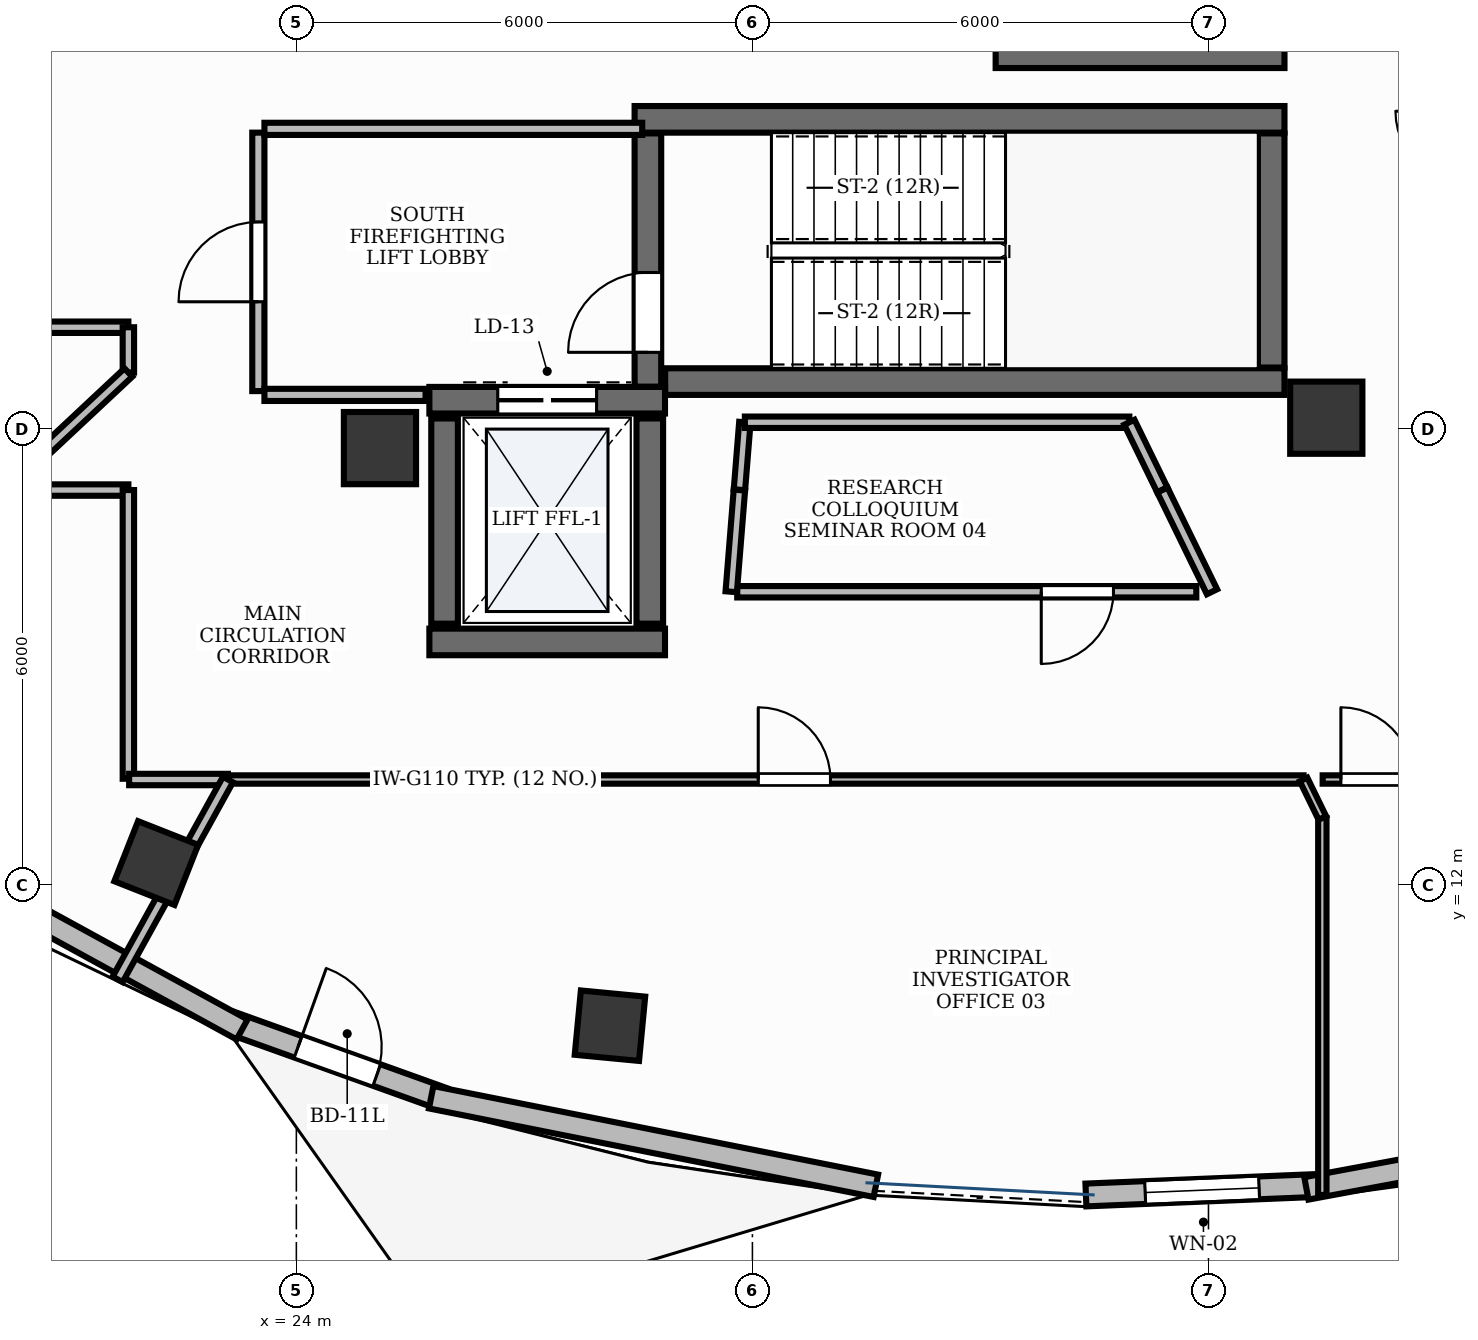
"""IFC4 building model, lengths in metres.
Left out: names, types, materials, properties, quantities, classifications, styles, units other than length and angle.
Written with IfcOpenShell. Run it as: python <this file> out.ifc"""

import sys

from ifc_helpers import new_model, si_unit, direction, frame, frame_2d, origin, origin_2d, place, context, subcontext, project, spatial, rectangle, extrude, element, fill, save


model = new_model("IFC4")
c1 = context("Model", 3, precision=1e-05, world=origin(), true_north=direction((0.0, 1.0)))
c2 = subcontext(c1, "Body", "Model", "MODEL_VIEW")
j1 = project(units=[si_unit("LENGTHUNIT", "METRE"), si_unit("PLANEANGLEUNIT", "RADIAN")], contexts=[c1])
p1 = place(None, origin())
s1 = spatial("IfcSite", under=j1, at=p1, CompositionType="ELEMENT")
p2 = place(p1, origin())
s2 = spatial("IfcBuilding", under=s1, at=p2, CompositionType="ELEMENT")
p3 = place(p2, frame((0.0, 0.0, 297.6)))
s3 = spatial("IfcBuildingStorey", under=s2, at=p3, CompositionType="ELEMENT", Elevation=297.6)
p4 = place(p3, frame((28.852, 18.625, 0.0), z_axis=(0.0, 0.0, 1.0), x_axis=(1.0, 0.0, 0.0)))
e1 = element("IfcWall", 1, at=p4, inside=s3, PredefinedType="SHEAR", context=c2, shape_type="SweptSolid", body=[
    extrude(rectangle(XDim=8.148, YDim=0.35, at=frame_2d((4.074, 0.0))), origin(), (0.0, 0.0, 1.0), 3.9),
])
p5 = place(p3, frame((28.45, 22.075, 0.0), z_axis=(0.0, 0.0, 1.0), x_axis=(1.0, 0.0, 0.0)))
e2 = element("IfcWall", 2, at=p5, inside=s3, PredefinedType="SHEAR", context=c2, shape_type="SweptSolid", body=[
    extrude(rectangle(XDim=8.55, YDim=0.35, at=frame_2d((4.275, 0.0))), origin(), (0.0, 0.0, 1.0), 3.9),
])
p6 = place(p3, frame((36.825, 18.81, 0.0), z_axis=(0.0, 0.0, 1.0), x_axis=(0.0, 1.0, 0.0)))
e3 = element("IfcWall", 3, at=p6, inside=s3, PredefinedType="SHEAR", context=c2, shape_type="SweptSolid", body=[
    extrude(rectangle(XDim=3.08, YDim=0.35, at=frame_2d((1.54, 0.0))), origin(), (0.0, 0.0, 1.0), 3.9),
])
p7 = place(p3, frame((28.625, 18.557, 0.0), z_axis=(0.0, 0.0, 1.0), x_axis=(0.0, 1.0, 0.0)))
e4 = element("IfcWall", 4, at=p7, inside=s3, PredefinedType="SHEAR", context=c2, shape_type="SweptSolid", body=[
    extrude(rectangle(XDim=3.333, YDim=0.35, at=frame_2d((1.667, 0.0))), origin(), (0.0, 0.0, 1.0), 3.9),
])
p8 = place(p7, frame((0.453, 0.0, 0.0)))
e5 = element("IfcOpeningElement", 5, at=p8, cuts=e4, PredefinedType="OPENING", context=c2, shape_type="SweptSolid", body=[
    extrude(rectangle(XDim=1.05, YDim=2.15, at=frame_2d((0.525, 1.075))), frame((0.0, 0.19, 0.0), z_axis=(0.0, -1.0, 0.0), x_axis=(1.0, 0.0, 0.0)), (0.0, 0.0, 1.0), 0.38),
])
p9 = place(p3, frame((33.2, 22.925, 0.0), z_axis=(0.0, 0.0, 1.0), x_axis=(1.0, 0.0, 0.0)))
e6 = element("IfcWall", 6, at=p9, inside=s3, PredefinedType="SHEAR", context=c2, shape_type="SweptSolid", body=[
    extrude(rectangle(XDim=3.8, YDim=0.35, at=frame_2d((1.9, 0.0))), origin(), (0.0, 0.0, 1.0), 3.9),
])
p10 = place(p3, frame((25.75, 15.2, 0.0), z_axis=(0.0, 0.0, 1.0), x_axis=(1.0, 0.0, 0.0)))
e7 = element("IfcWall", 7, at=p10, inside=s3, PredefinedType="SHEAR", context=c2, shape_type="SweptSolid", body=[
    extrude(rectangle(XDim=3.1, YDim=0.35, at=frame_2d((1.55, 0.0))), origin(), (0.0, 0.0, 1.0), 3.9),
])
p11 = place(p3, frame((25.75, 18.38, 0.0), z_axis=(0.0, 0.0, 1.0), x_axis=(1.0, 0.0, 0.0)))
e8 = element("IfcWall", 8, at=p11, inside=s3, PredefinedType="SHEAR", context=c2, shape_type="SweptSolid", body=[
    extrude(rectangle(XDim=3.1, YDim=0.35, at=frame_2d((1.55, 0.0))), origin(), (0.0, 0.0, 1.0), 3.9),
])
p12 = place(p11, frame((0.9, 0.0, 0.0)))
e9 = element("IfcOpeningElement", 9, at=p12, cuts=e8, PredefinedType="OPENING", context=c2, shape_type="SweptSolid", body=[
    extrude(rectangle(XDim=1.3, YDim=2.2, at=frame_2d((0.65, 1.1))), frame((0.0, 0.19, 0.0), z_axis=(0.0, -1.0, 0.0), x_axis=(1.0, 0.0, 0.0)), (0.0, 0.0, 1.0), 0.38),
])
for number, where, z_axis, x_axis in (
    (10, (25.95, 15.44, 0.0), (0.0, 0.0, 1.0), (0.0, 1.0, 0.0)),
    (11, (28.65, 15.44, 0.0), (0.0, 0.0, 1.0), (0.0, 1.0, 0.0)),
):
    element("IfcWall", number, at=place(p3, frame(where, z_axis=z_axis, x_axis=x_axis)), inside=s3, PredefinedType="SHEAR", context=c2, shape_type="SweptSolid", body=[
        extrude(rectangle(XDim=2.7, YDim=0.35, at=frame_2d((1.35, 0.0))), origin(), (0.0, 0.0, 1.0), 3.9),
    ])
for number, where, z_axis, x_axis in (
    (12, (25.1, 17.75, -0.0), (0.0, 0.0, 1.0), (1.0, 0.0, 0.0)),
    (13, (37.55, 18.15, -0.0), (0.0, 0.0, 1.0), (1.0, 0.0, 0.0)),
):
    element("IfcColumn", number, at=place(p3, frame(where, z_axis=z_axis, x_axis=x_axis)), inside=s3, PredefinedType="PILASTER", context=c2, shape_type="SweptSolid", body=[
        extrude(rectangle(XDim=0.95, YDim=0.95, at=origin_2d()), origin(), (0.0, 0.0, 1.0), 3.901),
    ])
for number, where, z_axis, x_axis in (
    (14, (22.157, 12.291, -0.0), (0.0, 0.0, 1.0), (-0.93, 0.367, 0.0)),
    (15, (28.126, 10.151, -0.0), (0.0, 0.0, 1.0), (-0.995, 0.095, 0.0)),
):
    element("IfcColumn", number, at=place(p3, frame(where, z_axis=z_axis, x_axis=x_axis)), inside=s3, PredefinedType="COLUMN", context=c2, shape_type="SweptSolid", body=[
        extrude(rectangle(XDim=0.85, YDim=0.85, at=origin_2d()), origin(), (0.0, 0.0, 1.0), 3.901),
    ])
p13 = place(p3, frame((23.146, 10.188, 0.0), z_axis=(0.0, 0.0, 1.0), x_axis=(0.941228252746, -0.337771189169, 0.0)))
e16 = element("IfcWall", 16, at=p13, inside=s3, PredefinedType="STANDARD", context=c2, shape_type="SweptSolid", body=[
    extrude(rectangle(XDim=2.963, YDim=0.3, at=frame_2d((1.482, 0.0))), origin(), (0.0, 0.0, 1.0), 3.9),
])
p14 = place(p13, frame((0.932, 0.0, 0.0)))
e17 = element("IfcOpeningElement", 17, at=p14, cuts=e16, PredefinedType="OPENING", context=c2, shape_type="SweptSolid", body=[
    extrude(rectangle(XDim=1.1, YDim=2.15, at=frame_2d((0.55, 1.075))), frame((0.0, 0.165, 0.0), z_axis=(0.0, -1.0, 0.0), x_axis=(1.0, 0.0, 0.0)), (0.0, 0.0, 1.0), 0.33),
])
p15 = place(p3, frame((34.388, 7.924, 0.0), z_axis=(0.0, 0.0, 1.0), x_axis=(0.999155735102, 0.041083050186, 0.0)))
e18 = element("IfcWall", 18, at=p15, inside=s3, PredefinedType="STANDARD", context=c2, shape_type="SweptSolid", body=[
    extrude(rectangle(XDim=3.061, YDim=0.3, at=frame_2d((1.53, 0.0))), origin(), (0.0, 0.0, 1.0), 3.9),
])
p16 = place(p15, frame((0.78, 0.0, 0.95)))
e19 = element("IfcOpeningElement", 19, at=p16, cuts=e18, PredefinedType="OPENING", context=c2, shape_type="SweptSolid", body=[
    extrude(rectangle(XDim=1.5, YDim=1.8, at=frame_2d((0.75, 0.9))), frame((0.0, 0.165, 0.0), z_axis=(0.0, -1.0, 0.0), x_axis=(1.0, 0.0, 0.0)), (0.0, 0.0, 1.0), 0.33),
])
p17 = place(p3, frame((18.327, 12.818, 0.0), z_axis=(0.0, 0.0, 1.0), x_axis=(0.877062479499, -0.480376318166, 0.0)))
e20 = element("IfcWall", 20, at=p17, inside=s3, PredefinedType="STANDARD", context=c2, shape_type="SweptSolid", body=[
    extrude(rectangle(XDim=5.654, YDim=0.3, at=frame_2d((2.827, 0.0))), origin(), (0.0, 0.0, 1.0), 3.9),
])
p18 = place(p3, frame((25.774, 9.21, 0.0), z_axis=(0.0, 0.0, 1.0), x_axis=(0.98075343527, -0.19525035008, 0.0)))
e21 = element("IfcWall", 21, at=p18, inside=s3, PredefinedType="STANDARD", context=c2, shape_type="SweptSolid", body=[
    extrude(rectangle(XDim=5.966, YDim=0.3, at=frame_2d((2.983, 0.0))), origin(), (0.0, 0.0, 1.0), 3.9),
])
p19 = place(p3, frame((37.288, 8.01, 0.0), z_axis=(0.0, 0.0, 1.0), x_axis=(0.983103205954, 0.183052141321, 0.0)))
e22 = element("IfcWall", 22, at=p19, inside=s3, PredefinedType="STANDARD", context=c2, shape_type="SweptSolid", body=[
    extrude(rectangle(XDim=5.974, YDim=0.3, at=frame_2d((2.987, 0.0))), origin(), (0.0, 0.0, 1.0), 3.9),
])
p20 = place(p3, frame((23.5, 18.5, 0.0), z_axis=(0.0, 0.0, 1.0), x_axis=(0.0, 1.0, 0.0)))
e23 = element("IfcWall", 23, at=p20, inside=s3, PredefinedType="PARTITIONING", context=c2, shape_type="SweptSolid", body=[
    extrude(rectangle(XDim=3.4, YDim=0.16, at=frame_2d((1.7, 0.0))), origin(), (0.0, 0.0, 1.0), 2.22),
])
p21 = place(p20, frame((1.175, 0.0, 0.0)))
e24 = element("IfcOpeningElement", 24, at=p21, cuts=e23, PredefinedType="OPENING", context=c2, shape_type="SweptSolid", body=[
    extrude(rectangle(XDim=1.05, YDim=2.15, at=frame_2d((0.525, 1.075))), frame((0.0, 0.095, 0.0), z_axis=(0.0, -1.0, 0.0), x_axis=(1.0, 0.0, 0.0)), (0.0, 0.0, 1.0), 0.19),
])
p22 = place(p3, frame((23.58, 21.95, 0.0), z_axis=(0.0, 0.0, 1.0), x_axis=(1.0, 0.0, 0.0)))
e25 = element("IfcWall", 25, at=p22, inside=s3, PredefinedType="PARTITIONING", context=c2, shape_type="SweptSolid", body=[
    extrude(rectangle(XDim=4.97, YDim=0.16, at=frame_2d((2.485, 0.0))), origin(), (0.0, 0.0, 1.0), 2.22),
])
p23 = place(p3, frame((23.58, 18.45, 0.0), z_axis=(0.0, 0.0, 1.0), x_axis=(1.0, 0.0, 0.0)))
e26 = element("IfcWall", 26, at=p23, inside=s3, PredefinedType="PARTITIONING", context=c2, shape_type="SweptSolid", body=[
    extrude(rectangle(XDim=2.12, YDim=0.16, at=frame_2d((1.06, 0.0))), origin(), (0.0, 0.0, 1.0), 2.22),
])
p24 = place(p3, frame((17.8, 19.34, 0.0), z_axis=(0.0, 0.0, 1.0), x_axis=(1.0, 0.0, 0.0)))
e27 = element("IfcWall", 27, at=p24, inside=s3, PredefinedType="PARTITIONING", context=c2, shape_type="SweptSolid", body=[
    extrude(rectangle(XDim=3.99, YDim=0.15, at=frame_2d((1.995, 0.0))), origin(), (0.0, 0.0, 1.0), 2.22),
])
p25 = place(p24, frame((0.507, 0.0, 0.0)))
e28 = element("IfcOpeningElement", 28, at=p25, cuts=e27, PredefinedType="OPENING", context=c2, shape_type="SweptSolid", body=[
    extrude(rectangle(XDim=0.95, YDim=2.15, at=frame_2d((0.475, 1.075))), frame((0.0, 0.09, 0.0), z_axis=(0.0, -1.0, 0.0), x_axis=(1.0, 0.0, 0.0)), (0.0, 0.0, 1.0), 0.18),
])
p26 = place(p3, frame((23.11, 13.39, 0.0), z_axis=(0.0, 0.0, 1.0), x_axis=(1.0, 0.0, 0.0)))
e29 = element("IfcWall", 29, at=p26, inside=s3, PredefinedType="MOVABLE", context=c2, shape_type="SweptSolid", body=[
    extrude(rectangle(XDim=14.141, YDim=0.11, at=frame_2d((7.071, 0.0))), origin(), (0.0, 0.0, 1.0), 2.22),
])
p27 = place(p26, frame((6.967, 0.0, 0.0)))
e30 = element("IfcOpeningElement", 30, at=p27, cuts=e29, PredefinedType="OPENING", context=c2, shape_type="SweptSolid", body=[
    extrude(rectangle(XDim=0.95, YDim=2.15, at=frame_2d((0.475, 1.075))), frame((0.0, 0.07, 0.0), z_axis=(0.0, -1.0, 0.0), x_axis=(1.0, 0.0, 0.0)), (0.0, 0.0, 1.0), 0.14),
])
p28 = place(p3, frame((35.84, 15.86, 0.0), z_axis=(0.0, 0.0, 1.0), x_axis=(-1.0, 0.0, 0.0)))
e31 = element("IfcWall", 31, at=p28, inside=s3, PredefinedType="PARTITIONING", context=c2, shape_type="SweptSolid", body=[
    extrude(rectangle(XDim=6.04, YDim=0.15, at=frame_2d((3.02, 0.0))), origin(), (0.0, 0.0, 1.0), 2.22),
])
p29 = place(p28, frame((1.09, 0.0, 0.0)))
e32 = element("IfcOpeningElement", 32, at=p29, cuts=e31, PredefinedType="OPENING", context=c2, shape_type="SweptSolid", body=[
    extrude(rectangle(XDim=0.95, YDim=2.15, at=frame_2d((0.475, 1.075))), frame((0.0, 0.09, 0.0), z_axis=(0.0, -1.0, 0.0), x_axis=(1.0, 0.0, 0.0)), (0.0, 0.0, 1.0), 0.18),
])
p30 = place(p3, frame((37.502, 13.39, 0.0), z_axis=(0.0, 0.0, 1.0), x_axis=(1.0, 0.0, 0.0)))
e33 = element("IfcWall", 33, at=p30, inside=s3, PredefinedType="MOVABLE", context=c2, shape_type="SweptSolid", body=[
    extrude(rectangle(XDim=1.898, YDim=0.11, at=frame_2d((0.949, 0.0))), origin(), (0.0, 0.0, 1.0), 2.22),
])
p31 = place(p30, frame((0.24, 0.0, 0.0)))
e34 = element("IfcOpeningElement", 34, at=p31, cuts=e33, PredefinedType="OPENING", context=c2, shape_type="SweptSolid", body=[
    extrude(rectangle(XDim=0.95, YDim=2.15, at=frame_2d((0.475, 1.075))), frame((0.0, 0.07, 0.0), z_axis=(0.0, -1.0, 0.0), x_axis=(1.0, 0.0, 0.0)), (0.0, 0.0, 1.0), 0.14),
])
p32 = place(p3, frame((20.148, 17.198, 0.0), z_axis=(0.0, 0.0, 1.0), x_axis=(1.0, 0.0, 0.0)))
e35 = element("IfcWall", 35, at=p32, inside=s3, PredefinedType="PARTITIONING", context=c2, shape_type="SweptSolid", body=[
    extrude(rectangle(XDim=1.642, YDim=0.15, at=frame_2d((0.821, 0.0))), origin(), (0.0, 0.0, 1.0), 2.22),
])
p33 = place(p3, frame((21.79, 17.198, 0.0), z_axis=(0.0, 0.0, 1.0), x_axis=(0.0, -1.0, 0.0)))
e36 = element("IfcWall", 36, at=p33, inside=s3, PredefinedType="PARTITIONING", context=c2, shape_type="SweptSolid", body=[
    extrude(rectangle(XDim=3.798, YDim=0.15, at=frame_2d((1.899, 0.0))), origin(), (0.0, 0.0, 1.0), 2.22),
])
p34 = place(p3, frame((21.8, 13.39, 0.0), z_axis=(0.0, 0.0, 1.0), x_axis=(1.0, 0.0, 0.0)))
e37 = element("IfcWall", 37, at=p34, inside=s3, PredefinedType="PARTITIONING", context=c2, shape_type="SweptSolid", body=[
    extrude(rectangle(XDim=1.3, YDim=0.15, at=frame_2d((0.65, 0.0))), origin(), (0.0, 0.0, 1.0), 2.22),
])
p35 = place(p3, frame((23.1, 13.39, 0.0), z_axis=(0.0, 0.0, 1.0), x_axis=(-0.483259990644, -0.875476888012, 0.0)))
e38 = element("IfcWall", 38, at=p35, inside=s3, PredefinedType="PARTITIONING", context=c2, shape_type="SweptSolid", body=[
    extrude(rectangle(XDim=3.003, YDim=0.15, at=frame_2d((1.502, 0.0))), origin(), (0.0, 0.0, 1.0), 2.22),
])
p36 = place(p3, frame((21.79, 19.34, 0.0), z_axis=(0.0, 0.0, 1.0), x_axis=(0.0, -1.0, 0.0)))
e39 = element("IfcWall", 39, at=p36, inside=s3, PredefinedType="PARTITIONING", context=c2, shape_type="SweptSolid", body=[
    extrude(rectangle(XDim=0.596, YDim=0.15, at=frame_2d((0.298, 0.0))), origin(), (0.0, 0.0, 1.0), 2.22),
])
p37 = place(p3, frame((21.79, 18.744, 0.0), z_axis=(0.0, 0.0, 1.0), x_axis=(-0.730182450716, -0.683252214534, 0.0)))
e40 = element("IfcWall", 40, at=p37, inside=s3, PredefinedType="PARTITIONING", context=c2, shape_type="SweptSolid", body=[
    extrude(rectangle(XDim=2.252, YDim=0.15, at=frame_2d((1.126, 0.0))), origin(), (0.0, 0.0, 1.0), 2.22),
])
p38 = place(p3, frame((37.498, 12.884, 0.0), z_axis=(0.0, 0.0, 1.0), x_axis=(0.0, -1.0, 0.0)))
e41 = element("IfcWall", 41, at=p38, inside=s3, PredefinedType="MOVABLE", context=c2, shape_type="SweptSolid", body=[
    extrude(rectangle(XDim=4.959, YDim=0.11, at=frame_2d((2.479, 0.0))), origin(), (0.0, 0.0, 1.0), 2.22),
])
p39 = place(p3, frame((37.251, 13.39, 0.0), z_axis=(0.0, 0.0, 1.0), x_axis=(0.43868863299, -0.898639128508, 0.0)))
e42 = element("IfcWall", 42, at=p39, inside=s3, PredefinedType="MOVABLE", context=c2, shape_type="SweptSolid", body=[
    extrude(rectangle(XDim=0.563, YDim=0.11, at=frame_2d((0.281, 0.0))), origin(), (0.0, 0.0, 1.0), 2.22),
])
p40 = place(p3, frame((29.829, 17.202, 0.0), z_axis=(0.0, 0.0, 1.0), x_axis=(0.080300744985, 0.996770680927, 0.0)))
e43 = element("IfcWall", 43, at=p40, inside=s3, PredefinedType="PARTITIONING", context=c2, shape_type="SweptSolid", body=[
    extrude(rectangle(XDim=0.891, YDim=0.15, at=frame_2d((0.445, 0.0))), origin(), (0.0, 0.0, 1.0), 2.22),
])
p41 = place(p3, frame((29.901, 18.09, 0.0), z_axis=(0.0, 0.0, 1.0), x_axis=(1.0, 0.0, 0.0)))
e44 = element("IfcWall", 44, at=p41, inside=s3, PredefinedType="PARTITIONING", context=c2, shape_type="SweptSolid", body=[
    extrude(rectangle(XDim=5.058, YDim=0.15, at=frame_2d((2.529, 0.0))), origin(), (0.0, 0.0, 1.0), 2.22),
])
p42 = place(p3, frame((34.959, 18.09, 0.0), z_axis=(0.0, 0.0, 1.0), x_axis=(0.438394418906, -0.898782695356, 0.0)))
e45 = element("IfcWall", 45, at=p42, inside=s3, PredefinedType="PARTITIONING", context=c2, shape_type="SweptSolid", body=[
    extrude(rectangle(XDim=0.988, YDim=0.15, at=frame_2d((0.494, 0.0))), origin(), (0.0, 0.0, 1.0), 2.22),
])
p43 = place(p3, frame((35.394, 17.198, 0.0), z_axis=(0.0, 0.0, 1.0), x_axis=(0.438401012414, -0.898779479247, 0.0)))
e46 = element("IfcWall", 46, at=p43, inside=s3, PredefinedType="PARTITIONING", context=c2, shape_type="SweptSolid", body=[
    extrude(rectangle(XDim=1.489, YDim=0.15, at=frame_2d((0.744, 0.0))), origin(), (0.0, 0.0, 1.0), 2.22),
])
p44 = place(p3, frame((29.721, 15.86, 0.0), z_axis=(0.0, 0.0, 1.0), x_axis=(0.080215129625, 0.996777574477, 0.0)))
e47 = element("IfcWall", 47, at=p44, inside=s3, PredefinedType="PARTITIONING", context=c2, shape_type="SweptSolid", body=[
    extrude(rectangle(XDim=1.342, YDim=0.15, at=frame_2d((0.671, 0.0))), origin(), (0.0, 0.0, 1.0), 2.22),
])
p45 = place(p14, origin())
e48 = element("IfcDoor", 48, at=p45, inside=s3, OperationType="SINGLE_SWING_LEFT", PredefinedType="DOOR", context=c2, shape_type="SweptSolid", body=[
    extrude(rectangle(XDim=1.1, YDim=2.15, at=frame_2d((0.55, 1.075))), frame((0.0, 0.025, 0.0), z_axis=(0.0, -1.0, 0.0), x_axis=(1.0, 0.0, 0.0)), (0.0, 0.0, 1.0), 0.05),
])
fill(e17, e48)
p46 = place(p16, origin())
e49 = element("IfcWindow", 49, at=p46, inside=s3, PartitioningType="DOUBLE_PANEL_VERTICAL", PredefinedType="WINDOW", context=c2, shape_type="SweptSolid", body=[
    extrude(rectangle(XDim=1.5, YDim=1.8, at=frame_2d((0.75, 0.9))), frame((0.0, 0.03, 0.0), z_axis=(0.0, -1.0, 0.0), x_axis=(1.0, 0.0, 0.0)), (0.0, 0.0, 1.0), 0.06),
])
fill(e19, e49)
p47 = place(p8, origin())
e50 = element("IfcDoor", 50, at=p47, inside=s3, OperationType="SINGLE_SWING_LEFT", PredefinedType="DOOR", context=c2, shape_type="SweptSolid", body=[
    extrude(rectangle(XDim=1.05, YDim=2.15, at=frame_2d((0.525, 1.075))), frame((0.0, 0.025, 0.0), z_axis=(0.0, -1.0, 0.0), x_axis=(1.0, 0.0, 0.0)), (0.0, 0.0, 1.0), 0.05),
])
fill(e5, e50)
p48 = place(p12, origin())
e51 = element("IfcDoor", 51, at=p48, inside=s3, OperationType="DOUBLE_DOOR_SLIDING", PredefinedType="DOOR", context=c2, shape_type="SweptSolid", body=[
    extrude(rectangle(XDim=1.3, YDim=2.2, at=frame_2d((0.65, 1.1))), frame((0.0, 0.025, 0.0), z_axis=(0.0, -1.0, 0.0), x_axis=(1.0, 0.0, 0.0)), (0.0, 0.0, 1.0), 0.05),
])
fill(e9, e51)
p49 = place(p21, origin())
e52 = element("IfcDoor", 52, at=p49, inside=s3, OperationType="SINGLE_SWING_LEFT", PredefinedType="DOOR", context=c2, shape_type="SweptSolid", body=[
    extrude(rectangle(XDim=1.05, YDim=2.15, at=frame_2d((0.525, 1.075))), frame((0.0, 0.025, 0.0), z_axis=(0.0, -1.0, 0.0), x_axis=(1.0, 0.0, 0.0)), (0.0, 0.0, 1.0), 0.05),
])
fill(e24, e52)
p50 = place(p27, origin())
e53 = element("IfcDoor", 53, at=p50, inside=s3, OperationType="SINGLE_SWING_LEFT", PredefinedType="DOOR", context=c2, shape_type="SweptSolid", body=[
    extrude(rectangle(XDim=0.95, YDim=2.15, at=frame_2d((0.475, 1.075))), frame((0.0, 0.025, 0.0), z_axis=(0.0, -1.0, 0.0), x_axis=(1.0, 0.0, 0.0)), (0.0, 0.0, 1.0), 0.05),
])
fill(e30, e53)
p51 = place(p29, origin())
e54 = element("IfcDoor", 54, at=p51, inside=s3, OperationType="SINGLE_SWING_RIGHT", PredefinedType="DOOR", context=c2, shape_type="SweptSolid", body=[
    extrude(rectangle(XDim=0.95, YDim=2.15, at=frame_2d((0.475, 1.075))), frame((0.0, 0.025, 0.0), z_axis=(0.0, -1.0, 0.0), x_axis=(1.0, 0.0, 0.0)), (0.0, 0.0, 1.0), 0.05),
])
fill(e32, e54)
p52 = place(p31, origin())
e55 = element("IfcDoor", 55, at=p52, inside=s3, OperationType="SINGLE_SWING_LEFT", PredefinedType="DOOR", context=c2, shape_type="SweptSolid", body=[
    extrude(rectangle(XDim=0.95, YDim=2.15, at=frame_2d((0.475, 1.075))), frame((0.0, 0.025, 0.0), z_axis=(0.0, -1.0, 0.0), x_axis=(1.0, 0.0, 0.0)), (0.0, 0.0, 1.0), 0.05),
])
fill(e34, e55)
save(model, sys.argv[1])
